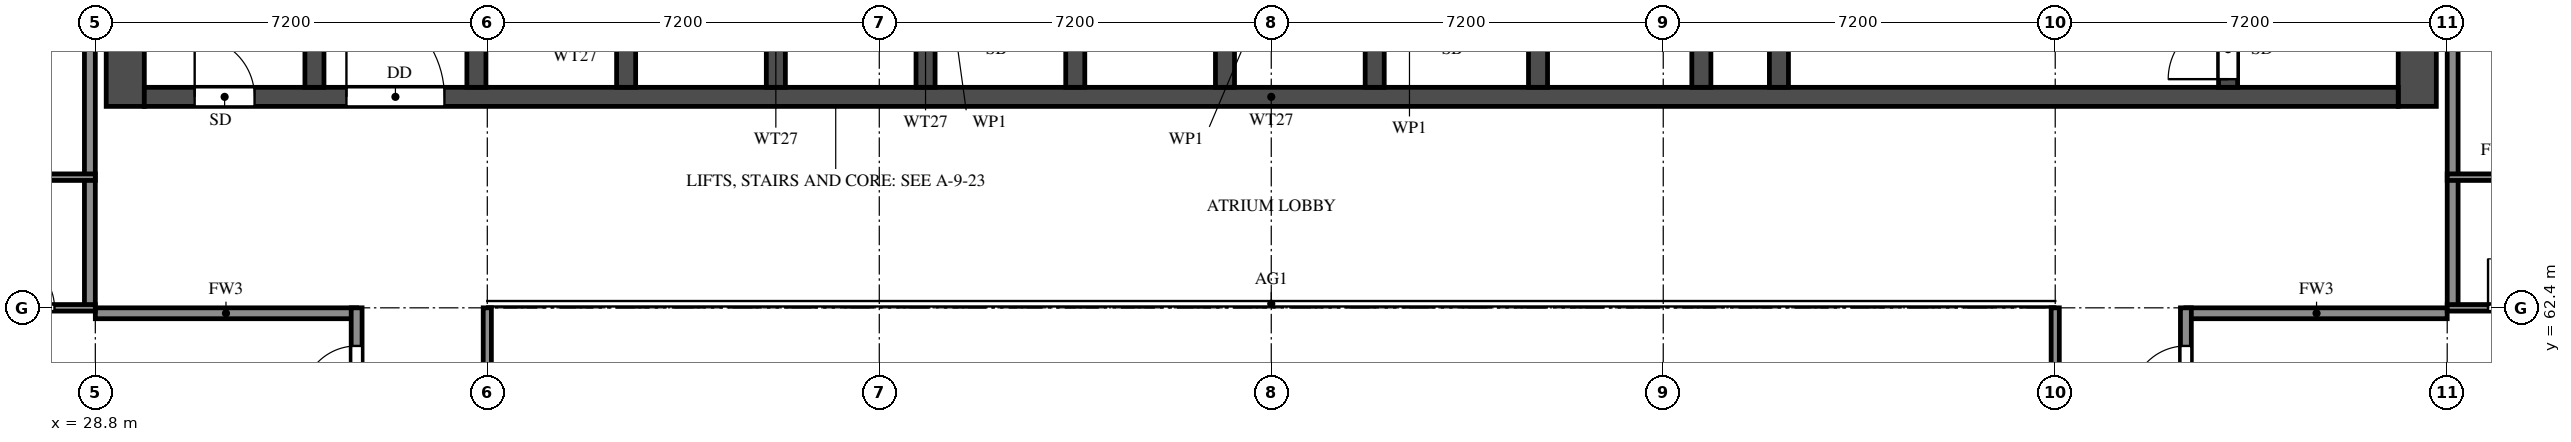
"""IFC4 building model, lengths in metres.
Left out: names, types, materials, properties, quantities, classifications, styles, units other than length and angle.
Written with IfcOpenShell. Run it as: python <this file> out.ifc"""

import sys

from ifc_helpers import new_model, si_unit, direction, frame, frame_2d, origin, place, context, subcontext, project, spatial, rectangle, extrude, element, fill, save


model = new_model("IFC4")
c1 = context("Model", 3, precision=1e-05, world=origin(), true_north=direction((0.0, 1.0)))
c2 = subcontext(c1, "Body", "Model", "MODEL_VIEW")
j1 = project(units=[si_unit("LENGTHUNIT", "METRE"), si_unit("PLANEANGLEUNIT", "RADIAN")], contexts=[c1])
p1 = place(None, origin())
s1 = spatial("IfcSite", under=j1, at=p1, CompositionType="ELEMENT")
p2 = place(p1, origin())
s2 = spatial("IfcBuilding", under=s1, at=p2, CompositionType="ELEMENT")
p3 = place(p2, frame((0.0, 0.0, 164.0)))
s3 = spatial("IfcBuildingStorey", under=s2, at=p3, CompositionType="ELEMENT", Elevation=164.0)
for number, where, z_axis, x_axis in (
    (1, (29.35, 66.1, 0.0), (0.0, 0.0, 1.0), (0.0, 1.0, 0.0)),
    (2, (71.45, 66.1, 0.0), (0.0, 0.0, 1.0), (0.0, 1.0, 0.0)),
):
    element("IfcWall", number, at=place(p3, frame(where, z_axis=z_axis, x_axis=x_axis)), inside=s3, PredefinedType="SHEAR", context=c2, shape_type="SweptSolid", body=[
        extrude(rectangle(XDim=11.9, YDim=0.7, at=frame_2d((5.95, 0.0))), origin(), (0.0, 0.0, 1.0), 3.2),
    ])
p4 = place(p3, frame((29.7, 66.275, 0.0), z_axis=(0.0, 0.0, 1.0), x_axis=(1.0, 0.0, 0.0)))
e3 = element("IfcWall", 3, at=p4, inside=s3, PredefinedType="SHEAR", context=c2, shape_type="SweptSolid", body=[
    extrude(rectangle(XDim=41.4, YDim=0.35, at=frame_2d((20.7, 0.0))), origin(), (0.0, 0.0, 1.0), 3.2),
])
p5 = place(p4, frame((0.925, 0.0, 0.0)))
e4 = element("IfcOpeningElement", 4, at=p5, cuts=e3, PredefinedType="OPENING", context=c2, shape_type="SweptSolid", body=[
    extrude(rectangle(XDim=1.1, YDim=2.1, at=frame_2d((0.55, 1.05))), frame((0.0, 0.185, 0.0), z_axis=(0.0, -1.0, 0.0), x_axis=(1.0, 0.0, 0.0)), (0.0, 0.0, 1.0), 0.37),
])
p6 = place(p4, frame((3.712, 0.0, 0.0)))
e5 = element("IfcOpeningElement", 5, at=p6, cuts=e3, PredefinedType="OPENING", context=c2, shape_type="SweptSolid", body=[
    extrude(rectangle(XDim=1.8, YDim=2.1, at=frame_2d((0.9, 1.05))), frame((0.0, 0.185, 0.0), z_axis=(0.0, -1.0, 0.0), x_axis=(1.0, 0.0, 0.0)), (0.0, 0.0, 1.0), 0.37),
])
p7 = place(p3, frame((32.825, 66.45, 0.0), z_axis=(0.0, 0.0, 1.0), x_axis=(0.0, 1.0, 0.0)))
e6 = element("IfcWall", 6, at=p7, inside=s3, PredefinedType="SHEAR", context=c2, shape_type="SweptSolid", body=[
    extrude(rectangle(XDim=10.85, YDim=0.35, at=frame_2d((5.425, 0.0))), origin(), (0.0, 0.0, 1.0), 3.2),
])
p8 = place(p3, frame((67.975, 66.45, 0.0), z_axis=(0.0, 0.0, 1.0), x_axis=(0.0, 1.0, 0.0)))
e7 = element("IfcWall", 7, at=p8, inside=s3, PredefinedType="SHEAR", context=c2, shape_type="SweptSolid", body=[
    extrude(rectangle(XDim=10.85, YDim=0.35, at=frame_2d((5.425, 0.0))), origin(), (0.0, 0.0, 1.0), 3.2),
])
p9 = place(p8, frame((0.15, 0.0, 0.0)))
e8 = element("IfcOpeningElement", 8, at=p9, cuts=e7, PredefinedType="OPENING", context=c2, shape_type="SweptSolid", body=[
    extrude(rectangle(XDim=1.1, YDim=2.1, at=frame_2d((0.55, 1.05))), frame((0.0, 0.185, 0.0), z_axis=(0.0, -1.0, 0.0), x_axis=(1.0, 0.0, 0.0)), (0.0, 0.0, 1.0), 0.37),
])
p10 = place(p3, frame((59.725, 66.45, 0.0), z_axis=(0.0, 0.0, 1.0), x_axis=(0.0, 1.0, 0.0)))
e9 = element("IfcWall", 9, at=p10, inside=s3, PredefinedType="SHEAR", context=c2, shape_type="SweptSolid", body=[
    extrude(rectangle(XDim=6.125, YDim=0.35, at=frame_2d((3.062, 0.0))), origin(), (0.0, 0.0, 1.0), 3.2),
])
p11 = place(p10, frame((3.85, 0.0, 0.0)))
e10 = element("IfcOpeningElement", 10, at=p11, cuts=e9, PredefinedType="OPENING", context=c2, shape_type="SweptSolid", body=[
    extrude(rectangle(XDim=1.2, YDim=2.1, at=frame_2d((0.6, 1.05))), frame((0.0, 0.185, 0.0), z_axis=(0.0, -1.0, 0.0), x_axis=(1.0, 0.0, 0.0)), (0.0, 0.0, 1.0), 0.37),
])
for number, where, z_axis, x_axis in (
    (11, (35.8, 66.45, 0.0), (0.0, 0.0, 1.0), (0.0, 1.0, 0.0)),
    (12, (38.55, 66.45, 0.0), (0.0, 0.0, 1.0), (0.0, 1.0, 0.0)),
    (13, (41.3, 66.45, 0.0), (0.0, 0.0, 1.0), (0.0, 1.0, 0.0)),
    (14, (44.05, 66.45, 0.0), (0.0, 0.0, 1.0), (0.0, 1.0, 0.0)),
    (15, (46.8, 66.45, 0.0), (0.0, 0.0, 1.0), (0.0, 1.0, 0.0)),
    (16, (49.55, 66.45, 0.0), (0.0, 0.0, 1.0), (0.0, 1.0, 0.0)),
    (17, (52.3, 66.45, 0.0), (0.0, 0.0, 1.0), (0.0, 1.0, 0.0)),
    (18, (55.3, 66.45, 0.0), (0.0, 0.0, 1.0), (0.0, 1.0, 0.0)),
    (19, (58.3, 66.45, 0.0), (0.0, 0.0, 1.0), (0.0, 1.0, 0.0)),
):
    element("IfcWall", number, at=place(p3, frame(where, z_axis=z_axis, x_axis=x_axis)), inside=s3, PredefinedType="SHEAR", context=c2, shape_type="SweptSolid", body=[
        extrude(rectangle(XDim=2.425, YDim=0.35, at=frame_2d((1.212, 0.0))), origin(), (0.0, 0.0, 1.0), 3.2),
    ])
for number, where, z_axis, x_axis in (
    (20, (28.8, 62.3, 0.0), (0.0, 0.0, 1.0), (1.0, 0.0, 0.0)),
    (21, (67.2, 62.3, 0.0), (0.0, 0.0, 1.0), (1.0, 0.0, 0.0)),
):
    element("IfcWall", number, at=place(p3, frame(where, z_axis=z_axis, x_axis=x_axis)), inside=s3, PredefinedType="SOLIDWALL", context=c2, shape_type="SweptSolid", body=[
        extrude(rectangle(XDim=4.8, YDim=0.2, at=frame_2d((2.4, 0.0))), origin(), (0.0, 0.0, 1.0), 3.2),
    ])
p12 = place(p3, frame((28.7, 62.4, 0.0), z_axis=(0.0, 0.0, 1.0), x_axis=(0.0, 1.0, 0.0)))
e22 = element("IfcWall", 22, at=p12, inside=s3, PredefinedType="SOLIDWALL", context=c2, shape_type="SweptSolid", body=[
    extrude(rectangle(XDim=15.6, YDim=0.2, at=frame_2d((7.8, 0.0))), origin(), (0.0, 0.0, 1.0), 3.2),
])
p13 = place(p3, frame((33.6, 60.0, 0.0), z_axis=(0.0, 0.0, 1.0), x_axis=(0.0, 1.0, 0.0)))
e23 = element("IfcWall", 23, at=p13, inside=s3, PredefinedType="SOLIDWALL", context=c2, shape_type="SweptSolid", body=[
    extrude(rectangle(XDim=2.4, YDim=0.2, at=frame_2d((1.2, 0.0))), origin(), (0.0, 0.0, 1.0), 3.2),
])
p14 = place(p13, frame((0.7, 0.0, 0.0)))
e24 = element("IfcOpeningElement", 24, at=p14, cuts=e23, PredefinedType="OPENING", context=c2, shape_type="SweptSolid", body=[
    extrude(rectangle(XDim=1.0, YDim=2.1, at=frame_2d((0.5, 1.05))), frame((0.0, 0.11, 0.0), z_axis=(0.0, -1.0, 0.0), x_axis=(1.0, 0.0, 0.0)), (0.0, 0.0, 1.0), 0.22),
])
p15 = place(p3, frame((67.2, 45.6, 0.0), z_axis=(0.0, 0.0, 1.0), x_axis=(0.0, 1.0, 0.0)))
e25 = element("IfcWall", 25, at=p15, inside=s3, PredefinedType="SOLIDWALL", context=c2, shape_type="SweptSolid", body=[
    extrude(rectangle(XDim=16.8, YDim=0.2, at=frame_2d((8.4, 0.0))), origin(), (0.0, 0.0, 1.0), 3.2),
])
p16 = place(p15, frame((6.7, 0.0, 0.0)))
e26 = element("IfcOpeningElement", 26, at=p16, cuts=e25, PredefinedType="OPENING", context=c2, shape_type="SweptSolid", body=[
    extrude(rectangle(XDim=1.0, YDim=2.1, at=frame_2d((0.5, 1.05))), frame((0.0, 0.11, 0.0), z_axis=(0.0, -1.0, 0.0), x_axis=(1.0, 0.0, 0.0)), (0.0, 0.0, 1.0), 0.22),
])
p17 = place(p15, frame((15.1, 0.0, 0.0)))
e27 = element("IfcOpeningElement", 27, at=p17, cuts=e25, PredefinedType="OPENING", context=c2, shape_type="SweptSolid", body=[
    extrude(rectangle(XDim=1.0, YDim=2.1, at=frame_2d((0.5, 1.05))), frame((0.0, 0.11, 0.0), z_axis=(0.0, -1.0, 0.0), x_axis=(1.0, 0.0, 0.0)), (0.0, 0.0, 1.0), 0.22),
])
p18 = place(p15, frame((0.7, 0.0, 0.0)))
e28 = element("IfcOpeningElement", 28, at=p18, cuts=e25, PredefinedType="OPENING", context=c2, shape_type="SweptSolid", body=[
    extrude(rectangle(XDim=1.0, YDim=2.1, at=frame_2d((0.5, 1.05))), frame((0.0, 0.11, 0.0), z_axis=(0.0, -1.0, 0.0), x_axis=(1.0, 0.0, 0.0)), (0.0, 0.0, 1.0), 0.22),
])
p19 = place(p3, frame((72.1, 62.4, 0.0), z_axis=(0.0, 0.0, 1.0), x_axis=(0.0, 1.0, 0.0)))
e29 = element("IfcWall", 29, at=p19, inside=s3, PredefinedType="SOLIDWALL", context=c2, shape_type="SweptSolid", body=[
    extrude(rectangle(XDim=15.6, YDim=0.2, at=frame_2d((7.8, 0.0))), origin(), (0.0, 0.0, 1.0), 3.2),
])
p20 = place(p3, frame((26.4, 62.4, 0.0), z_axis=(0.0, 0.0, 1.0), x_axis=(1.0, 0.0, 0.0)))
e30 = element("IfcWall", 30, at=p20, inside=s3, PredefinedType="PARTITIONING", context=c2, shape_type="SweptSolid", body=[
    extrude(rectangle(XDim=2.4, YDim=0.12, at=frame_2d((1.2, 0.0))), origin(), (0.0, 0.0, 1.0), 3.2),
])
p21 = place(p20, frame((0.75, 0.0, 0.0)))
e31 = element("IfcOpeningElement", 31, at=p21, cuts=e30, PredefinedType="OPENING", context=c2, shape_type="SweptSolid", body=[
    extrude(rectangle(XDim=0.9, YDim=2.1, at=frame_2d((0.45, 1.05))), frame((0.0, 0.07, 0.0), z_axis=(0.0, -1.0, 0.0), x_axis=(1.0, 0.0, 0.0)), (0.0, 0.0, 1.0), 0.14),
])
p22 = place(p3, frame((72.0, 62.4, 0.0), z_axis=(0.0, 0.0, 1.0), x_axis=(1.0, 0.0, 0.0)))
e32 = element("IfcWall", 32, at=p22, inside=s3, PredefinedType="PARTITIONING", context=c2, shape_type="SweptSolid", body=[
    extrude(rectangle(XDim=2.4, YDim=0.12, at=frame_2d((1.2, 0.0))), origin(), (0.0, 0.0, 1.0), 3.2),
])
p23 = place(p22, frame((0.75, 0.0, 0.0)))
e33 = element("IfcOpeningElement", 33, at=p23, cuts=e32, PredefinedType="OPENING", context=c2, shape_type="SweptSolid", body=[
    extrude(rectangle(XDim=0.9, YDim=2.1, at=frame_2d((0.45, 1.05))), frame((0.0, 0.07, 0.0), z_axis=(0.0, -1.0, 0.0), x_axis=(1.0, 0.0, 0.0)), (0.0, 0.0, 1.0), 0.14),
])
p24 = place(p3, frame((23.7, 64.8, 0.0), z_axis=(0.0, 0.0, 1.0), x_axis=(1.0, 0.0, 0.0)))
e34 = element("IfcWall", 34, at=p24, inside=s3, PredefinedType="PARTITIONING", context=c2, shape_type="SweptSolid", body=[
    extrude(rectangle(XDim=5.1, YDim=0.12, at=frame_2d((2.55, 0.0))), origin(), (0.0, 0.0, 1.0), 3.2),
])
p25 = place(p24, frame((2.1, 0.0, 0.0)))
e35 = element("IfcOpeningElement", 35, at=p25, cuts=e34, PredefinedType="OPENING", context=c2, shape_type="SweptSolid", body=[
    extrude(rectangle(XDim=0.9, YDim=2.1, at=frame_2d((0.45, 1.05))), frame((0.0, 0.07, 0.0), z_axis=(0.0, -1.0, 0.0), x_axis=(1.0, 0.0, 0.0)), (0.0, 0.0, 1.0), 0.14),
])
p26 = place(p3, frame((72.0, 64.8, 0.0), z_axis=(0.0, 0.0, 1.0), x_axis=(1.0, 0.0, 0.0)))
e36 = element("IfcWall", 36, at=p26, inside=s3, PredefinedType="PARTITIONING", context=c2, shape_type="SweptSolid", body=[
    extrude(rectangle(XDim=5.1, YDim=0.12, at=frame_2d((2.55, 0.0))), origin(), (0.0, 0.0, 1.0), 3.2),
])
p27 = place(p26, frame((2.1, 0.0, 0.0)))
e37 = element("IfcOpeningElement", 37, at=p27, cuts=e36, PredefinedType="OPENING", context=c2, shape_type="SweptSolid", body=[
    extrude(rectangle(XDim=0.9, YDim=2.1, at=frame_2d((0.45, 1.05))), frame((0.0, 0.07, 0.0), z_axis=(0.0, -1.0, 0.0), x_axis=(1.0, 0.0, 0.0)), (0.0, 0.0, 1.0), 0.14),
])
for number, where, z_axis, x_axis in (
    (38, (36.0, 48.0, 0.0), (0.0, 0.0, 1.0), (0.0, 1.0, 0.0)),
    (39, (64.8, 48.0, 0.0), (0.0, 0.0, 1.0), (0.0, 1.0, 0.0)),
):
    element("IfcWall", number, at=place(p3, frame(where, z_axis=z_axis, x_axis=x_axis)), inside=s3, PredefinedType="SOLIDWALL", context=c2, shape_type="SweptSolid", body=[
        extrude(rectangle(XDim=14.4, YDim=0.15, at=frame_2d((7.2, 0.0))), origin(), (0.0, 0.0, 1.0), 2.3),
    ])
p28 = place(p5, origin())
e40 = element("IfcDoor", 40, at=p28, inside=s3, OperationType="SINGLE_SWING_LEFT", PredefinedType="DOOR", context=c2, shape_type="SweptSolid", body=[
    extrude(rectangle(XDim=1.1, YDim=2.1, at=frame_2d((0.55, 1.05))), frame((0.0, 0.025, 0.0), z_axis=(0.0, -1.0, 0.0), x_axis=(1.0, 0.0, 0.0)), (0.0, 0.0, 1.0), 0.05),
])
fill(e4, e40)
p29 = place(p9, origin())
e41 = element("IfcDoor", 41, at=p29, inside=s3, OperationType="SINGLE_SWING_LEFT", PredefinedType="DOOR", context=c2, shape_type="SweptSolid", body=[
    extrude(rectangle(XDim=1.1, YDim=2.1, at=frame_2d((0.55, 1.05))), frame((0.0, 0.025, 0.0), z_axis=(0.0, -1.0, 0.0), x_axis=(1.0, 0.0, 0.0)), (0.0, 0.0, 1.0), 0.05),
])
fill(e8, e41)
p30 = place(p6, origin())
e42 = element("IfcDoor", 42, at=p30, inside=s3, OperationType="DOUBLE_DOOR_SINGLE_SWING", PredefinedType="DOOR", context=c2, shape_type="SweptSolid", body=[
    extrude(rectangle(XDim=1.8, YDim=2.1, at=frame_2d((0.9, 1.05))), frame((0.0, 0.025, 0.0), z_axis=(0.0, -1.0, 0.0), x_axis=(1.0, 0.0, 0.0)), (0.0, 0.0, 1.0), 0.05),
])
fill(e5, e42)
p31 = place(p21, origin())
e43 = element("IfcDoor", 43, at=p31, inside=s3, OperationType="SINGLE_SWING_LEFT", PredefinedType="DOOR", context=c2, shape_type="SweptSolid", body=[
    extrude(rectangle(XDim=0.9, YDim=2.1, at=frame_2d((0.45, 1.05))), frame((0.0, 0.025, 0.0), z_axis=(0.0, -1.0, 0.0), x_axis=(1.0, 0.0, 0.0)), (0.0, 0.0, 1.0), 0.05),
])
fill(e31, e43)
p32 = place(p14, origin())
e44 = element("IfcDoor", 44, at=p32, inside=s3, OperationType="SINGLE_SWING_LEFT", PredefinedType="DOOR", context=c2, shape_type="SweptSolid", body=[
    extrude(rectangle(XDim=1.0, YDim=2.1, at=frame_2d((0.5, 1.05))), frame((0.0, 0.025, 0.0), z_axis=(0.0, -1.0, 0.0), x_axis=(1.0, 0.0, 0.0)), (0.0, 0.0, 1.0), 0.05),
])
fill(e24, e44)
p33 = place(p23, origin())
e45 = element("IfcDoor", 45, at=p33, inside=s3, OperationType="SINGLE_SWING_RIGHT", PredefinedType="DOOR", context=c2, shape_type="SweptSolid", body=[
    extrude(rectangle(XDim=0.9, YDim=2.1, at=frame_2d((0.45, 1.05))), frame((0.0, 0.025, 0.0), z_axis=(0.0, -1.0, 0.0), x_axis=(1.0, 0.0, 0.0)), (0.0, 0.0, 1.0), 0.05),
])
fill(e33, e45)
p34 = place(p17, origin())
e46 = element("IfcDoor", 46, at=p34, inside=s3, OperationType="SINGLE_SWING_LEFT", PredefinedType="DOOR", context=c2, shape_type="SweptSolid", body=[
    extrude(rectangle(XDim=1.0, YDim=2.1, at=frame_2d((0.5, 1.05))), frame((0.0, 0.025, 0.0), z_axis=(0.0, -1.0, 0.0), x_axis=(1.0, 0.0, 0.0)), (0.0, 0.0, 1.0), 0.05),
])
fill(e27, e46)
save(model, sys.argv[1])
